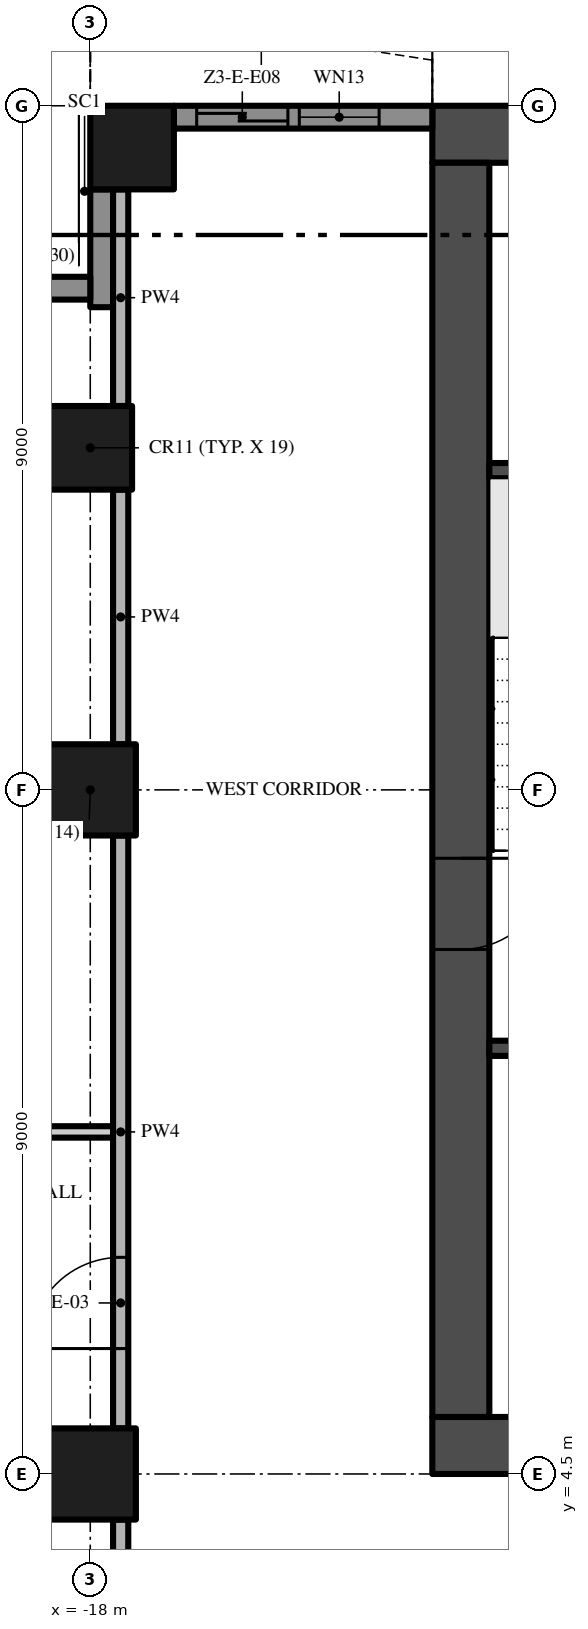
"""IFC4 building model, lengths in metres.
Left out: names, types, materials, properties, quantities, classifications, styles, units other than length and angle.
Written with IfcOpenShell. Run it as: python <this file> out.ifc"""

import sys

from ifc_helpers import new_model, si_unit, direction, frame, frame_2d, origin, origin_2d, place, context, subcontext, project, spatial, polyline, rectangle, outline, extrude, element, fill, save


model = new_model("IFC4")
c1 = context("Model", 3, precision=1e-05, world=origin(), true_north=direction((0.0, 1.0)))
c2 = subcontext(c1, "Body", "Model", "MODEL_VIEW")
j1 = project(units=[si_unit("LENGTHUNIT", "METRE"), si_unit("PLANEANGLEUNIT", "RADIAN")], contexts=[c1])
p1 = place(None, origin())
s1 = spatial("IfcSite", under=j1, at=p1, CompositionType="ELEMENT")
p2 = place(p1, origin())
s2 = spatial("IfcBuilding", under=s1, at=p2, CompositionType="ELEMENT")
p3 = place(p2, frame((0.0, 0.0, 166.8)))
s3 = spatial("IfcBuildingStorey", under=s2, at=p3, CompositionType="ELEMENT", Elevation=166.8)
p4 = place(p3, frame((-13.5, 4.875, -0.3), z_axis=(0.0, 0.0, 1.0), x_axis=(1.0, 0.0, 0.0)))
e1 = element("IfcWall", 1, at=p4, inside=s3, PredefinedType="SHEAR", context=c2, shape_type="SweptSolid", body=[
    extrude(rectangle(XDim=27.0, YDim=0.75, at=frame_2d((13.5, 0.0))), origin(), (0.0, 0.0, 1.0), 3.8),
])
p5 = place(p4, frame((12.0, 0.0, 0.3)))
e2 = element("IfcOpeningElement", 2, at=p5, cuts=e1, PredefinedType="OPENING", context=c2, shape_type="SweptSolid", body=[
    extrude(rectangle(XDim=3.0, YDim=2.4, at=frame_2d((1.5, 1.2))), frame((0.0, 0.385, 0.0), z_axis=(0.0, -1.0, 0.0), x_axis=(1.0, 0.0, 0.0)), (0.0, 0.0, 1.0), 0.77),
])
p6 = place(p4, frame((4.9, 0.0, 0.3)))
e3 = element("IfcOpeningElement", 3, at=p6, cuts=e1, PredefinedType="OPENING", context=c2, shape_type="SweptSolid", body=[
    extrude(rectangle(XDim=1.2, YDim=2.2, at=frame_2d((0.6, 1.1))), frame((0.0, 0.385, 0.0), z_axis=(0.0, -1.0, 0.0), x_axis=(1.0, 0.0, 0.0)), (0.0, 0.0, 1.0), 0.77),
])
p7 = place(p4, frame((20.75, 0.0, 0.3)))
e4 = element("IfcOpeningElement", 4, at=p7, cuts=e1, PredefinedType="OPENING", context=c2, shape_type="SweptSolid", body=[
    extrude(rectangle(XDim=1.5, YDim=2.2, at=frame_2d((0.75, 1.1))), frame((0.0, 0.385, 0.0), z_axis=(0.0, -1.0, 0.0), x_axis=(1.0, 0.0, 0.0)), (0.0, 0.0, 1.0), 0.77),
])
p8 = place(p4, frame((17.4, 0.0, 0.3)))
e5 = element("IfcOpeningElement", 5, at=p8, cuts=e1, PredefinedType="OPENING", context=c2, shape_type="SweptSolid", body=[
    extrude(rectangle(XDim=1.2, YDim=2.2, at=frame_2d((0.6, 1.1))), frame((0.0, 0.385, 0.0), z_axis=(0.0, -1.0, 0.0), x_axis=(1.0, 0.0, 0.0)), (0.0, 0.0, 1.0), 0.77),
])
p9 = place(p3, frame((13.5, 22.125, -0.3), z_axis=(0.0, 0.0, 1.0), x_axis=(-1.0, 0.0, 0.0)))
e6 = element("IfcWall", 6, at=p9, inside=s3, PredefinedType="SHEAR", context=c2, shape_type="SweptSolid", body=[
    extrude(rectangle(XDim=27.0, YDim=0.75, at=frame_2d((13.5, 0.0))), origin(), (0.0, 0.0, 1.0), 3.8),
])
p10 = place(p3, frame((-13.125, 21.75, -0.3), z_axis=(0.0, 0.0, 1.0), x_axis=(0.0, -1.0, 0.0)))
e7 = element("IfcWall", 7, at=p10, inside=s3, PredefinedType="SHEAR", context=c2, shape_type="SweptSolid", body=[
    extrude(rectangle(XDim=16.5, YDim=0.75, at=frame_2d((8.25, 0.0))), origin(), (0.0, 0.0, 1.0), 3.8),
])
p11 = place(p10, frame((9.15, 0.0, 0.3)))
e8 = element("IfcOpeningElement", 8, at=p11, cuts=e7, PredefinedType="OPENING", context=c2, shape_type="SweptSolid", body=[
    extrude(rectangle(XDim=1.2, YDim=2.2, at=frame_2d((0.6, 1.1))), frame((0.0, 0.385, 0.0), z_axis=(0.0, -1.0, 0.0), x_axis=(1.0, 0.0, 0.0)), (0.0, 0.0, 1.0), 0.77),
])
p12 = place(p3, frame((-18.0, 13.5, 0.0), z_axis=(0.0, 0.0, 1.0), x_axis=(1.0, 0.0, 0.0)))
e9 = element("IfcColumn", 9, at=p12, inside=s3, PredefinedType="COLUMN", context=c2, shape_type="SweptSolid", body=[
    extrude(rectangle(XDim=1.2, YDim=1.2, at=origin_2d()), origin(), (0.0, 0.0, 1.0), 3.5),
])
p13 = place(p3, frame((-17.45, 21.95, 0.0), z_axis=(0.0, 0.0, 1.0), x_axis=(1.0, 0.0, 0.0)))
e10 = element("IfcColumn", 10, at=p13, inside=s3, PredefinedType="COLUMN", context=c2, shape_type="SweptSolid", body=[
    extrude(rectangle(XDim=1.1, YDim=1.1, at=origin_2d()), origin(), (0.0, 0.0, 1.0), 3.5),
])
p14 = place(p3, frame((-18.0, 4.5, 0.0), z_axis=(0.0, 0.0, 1.0), x_axis=(1.0, 0.0, 0.0)))
e11 = element("IfcColumn", 11, at=p14, inside=s3, PredefinedType="COLUMN", context=c2, shape_type="SweptSolid", body=[
    extrude(rectangle(XDim=1.2, YDim=1.2, at=origin_2d()), origin(), (0.0, 0.0, 1.0), 3.5),
])
p15 = place(p3, frame((-18.0, 18.0, 0.0), z_axis=(0.0, 0.0, 1.0), x_axis=(1.0, 0.0, 0.0)))
e12 = element("IfcColumn", 12, at=p15, inside=s3, PredefinedType="COLUMN", context=c2, shape_type="SweptSolid", body=[
    extrude(rectangle(XDim=1.1, YDim=1.1, at=origin_2d()), origin(), (0.0, 0.0, 1.0), 3.5),
])
p16 = place(p3, frame((-16.9, 22.35, 0.0), z_axis=(0.0, 0.0, 1.0), x_axis=(1.0, 0.0, 0.0)))
e13 = element("IfcWall", 13, at=p16, inside=s3, PredefinedType="SOLIDWALL", context=c2, shape_type="SweptSolid", body=[
    extrude(rectangle(XDim=3.4, YDim=0.3, at=frame_2d((1.7, 0.0))), origin(), (0.0, 0.0, 1.0), 3.5),
])
p17 = place(p16, frame((1.65, 0.0, 0.45)))
e14 = element("IfcOpeningElement", 14, at=p17, cuts=e13, PredefinedType="OPENING", context=c2, shape_type="SweptSolid", body=[
    extrude(rectangle(XDim=1.05, YDim=2.65, at=frame_2d((0.525, 1.325))), frame((0.0, 0.16, 0.0), z_axis=(0.0, -1.0, 0.0), x_axis=(1.0, 0.0, 0.0)), (0.0, 0.0, 1.0), 0.32),
])
p18 = place(p16, frame((0.3, 0.0, 0.0)))
e15 = element("IfcOpeningElement", 15, at=p18, cuts=e13, PredefinedType="OPENING", context=c2, shape_type="SweptSolid", body=[
    extrude(rectangle(XDim=1.2, YDim=2.4, at=frame_2d((0.6, 1.2))), frame((0.0, 0.16, 0.0), z_axis=(0.0, -1.0, 0.0), x_axis=(1.0, 0.0, 0.0)), (0.0, 0.0, 1.0), 0.32),
])
p19 = place(p3, frame((-17.85, 19.85, 0.0), z_axis=(0.0, 0.0, 1.0), x_axis=(0.0, 1.0, 0.0)))
e16 = element("IfcWall", 16, at=p19, inside=s3, PredefinedType="SOLIDWALL", context=c2, shape_type="SweptSolid", body=[
    extrude(rectangle(XDim=1.55, YDim=0.3, at=frame_2d((0.775, 0.0))), origin(), (0.0, 0.0, 1.0), 3.5),
])
p20 = place(p3, frame((-20.25, 20.1, 0.0), z_axis=(0.0, 0.0, 1.0), x_axis=(1.0, 0.0, 0.0)))
e17 = element("IfcWall", 17, at=p20, inside=s3, PredefinedType="SOLIDWALL", context=c2, shape_type="SweptSolid", body=[
    extrude(rectangle(XDim=2.25, YDim=0.3, at=frame_2d((1.125, 0.0))), origin(), (0.0, 0.0, 1.0), 3.5),
])
p21 = place(p3, origin())
e18 = element("IfcWall", 18, at=p21, inside=s3, PredefinedType="USERDEFINED", context=c2, shape_type="SweptSolid", body=[
    extrude(outline(polyline([(-13.5, 23.1), (-15.0, 23.329), (-16.5, 23.929), (-18.0, 24.671), (-18.111, 24.447), (-16.602, 23.701), (-15.066, 23.086), (-13.538, 22.853), (-13.5, 23.1)])), origin(), (0.0, 0.0, 1.0), 0.9),
])
for number, where, z_axis, x_axis in (
    (19, (-12.75, 10.1, 0.0), (0.0, 0.0, 1.0), (1.0, 0.0, 0.0)),
    (20, (-12.75, 17.7, 0.0), (0.0, 0.0, 1.0), (1.0, 0.0, 0.0)),
):
    element("IfcWall", number, at=place(p3, frame(where, z_axis=z_axis, x_axis=x_axis)), inside=s3, PredefinedType="SHEAR", context=c2, shape_type="SweptSolid", body=[
        extrude(rectangle(XDim=3.1, YDim=0.2, at=frame_2d((1.55, 0.0))), origin(), (0.0, 0.0, 1.0), 3.5),
    ])
p22 = place(p3, frame((-22.2, 9.0, 0.0), z_axis=(0.0, 0.0, 1.0), x_axis=(1.0, 0.0, 0.0)))
e21 = element("IfcWall", 21, at=p22, inside=s3, PredefinedType="PARTITIONING", context=c2, shape_type="SweptSolid", body=[
    extrude(rectangle(XDim=4.5, YDim=0.15, at=frame_2d((2.25, 0.0))), origin(), (0.0, 0.0, 1.0), 3.5),
])
p23 = place(p22, frame((1.65, 0.0, 0.0)))
e22 = element("IfcOpeningElement", 22, at=p23, cuts=e21, PredefinedType="OPENING", context=c2, shape_type="SweptSolid", body=[
    extrude(rectangle(XDim=1.0, YDim=2.4, at=frame_2d((0.5, 1.2))), frame((0.0, 0.085, 0.0), z_axis=(0.0, -1.0, 0.0), x_axis=(1.0, 0.0, 0.0)), (0.0, 0.0, 1.0), 0.17),
])
p24 = place(p3, frame((-17.6, -0.2, 0.0), z_axis=(0.0, 0.0, 1.0), x_axis=(0.0, 1.0, 0.0)))
e23 = element("IfcWall", 23, at=p24, inside=s3, PredefinedType="PARTITIONING", context=c2, shape_type="SweptSolid", body=[
    extrude(rectangle(XDim=4.1, YDim=0.2, at=frame_2d((2.05, 0.0))), origin(), (0.0, 0.0, 1.0), 3.5),
])
p25 = place(p3, frame((-17.6, 5.1, 0.0), z_axis=(0.0, 0.0, 1.0), x_axis=(0.0, 1.0, 0.0)))
e24 = element("IfcWall", 24, at=p25, inside=s3, PredefinedType="PARTITIONING", context=c2, shape_type="SweptSolid", body=[
    extrude(rectangle(XDim=7.8, YDim=0.2, at=frame_2d((3.9, 0.0))), origin(), (0.0, 0.0, 1.0), 3.5),
])
p26 = place(p25, frame((1.05, 0.0, 0.0)))
e25 = element("IfcOpeningElement", 25, at=p26, cuts=e24, PredefinedType="OPENING", context=c2, shape_type="SweptSolid", body=[
    extrude(rectangle(XDim=1.2, YDim=2.4, at=frame_2d((0.6, 1.2))), frame((0.0, 0.11, 0.0), z_axis=(0.0, -1.0, 0.0), x_axis=(1.0, 0.0, 0.0)), (0.0, 0.0, 1.0), 0.22),
])
p27 = place(p3, frame((-17.6, 14.1, 0.0), z_axis=(0.0, 0.0, 1.0), x_axis=(0.0, 1.0, 0.0)))
e26 = element("IfcWall", 26, at=p27, inside=s3, PredefinedType="PARTITIONING", context=c2, shape_type="SweptSolid", body=[
    extrude(rectangle(XDim=3.35, YDim=0.2, at=frame_2d((1.675, 0.0))), origin(), (0.0, 0.0, 1.0), 3.5),
])
p28 = place(p3, frame((-17.6, 18.55, 0.0), z_axis=(0.0, 0.0, 1.0), x_axis=(0.0, 1.0, 0.0)))
e27 = element("IfcWall", 27, at=p28, inside=s3, PredefinedType="PARTITIONING", context=c2, shape_type="SweptSolid", body=[
    extrude(rectangle(XDim=2.85, YDim=0.2, at=frame_2d((1.425, 0.0))), origin(), (0.0, 0.0, 1.0), 3.5),
])
p29 = place(p17, origin())
e28 = element("IfcWindow", 28, at=p29, inside=s3, PartitioningType="SINGLE_PANEL", PredefinedType="WINDOW", context=c2, shape_type="SweptSolid", body=[
    extrude(rectangle(XDim=1.05, YDim=2.65, at=frame_2d((0.525, 1.325))), frame((0.0, 0.03, 0.0), z_axis=(0.0, -1.0, 0.0), x_axis=(1.0, 0.0, 0.0)), (0.0, 0.0, 1.0), 0.06),
])
fill(e14, e28)
p30 = place(p18, origin())
e29 = element("IfcDoor", 29, at=p30, inside=s3, OperationType="SINGLE_SWING_LEFT", PredefinedType="DOOR", context=c2, shape_type="SweptSolid", body=[
    extrude(rectangle(XDim=1.2, YDim=2.4, at=frame_2d((0.6, 1.2))), frame((0.0, 0.025, 0.0), z_axis=(0.0, -1.0, 0.0), x_axis=(1.0, 0.0, 0.0)), (0.0, 0.0, 1.0), 0.05),
])
fill(e15, e29)
p31 = place(p11, frame((1.2, 0.0, 0.0), z_axis=(0.0, 0.0, 1.0), x_axis=(-1.0, 0.0, 0.0)))
e30 = element("IfcDoor", 30, at=p31, inside=s3, OperationType="SINGLE_SWING_RIGHT", PredefinedType="DOOR", context=c2, shape_type="SweptSolid", body=[
    extrude(rectangle(XDim=1.2, YDim=2.2, at=frame_2d((0.6, 1.1))), frame((0.0, 0.025, 0.0), z_axis=(0.0, -1.0, 0.0), x_axis=(1.0, 0.0, 0.0)), (0.0, 0.0, 1.0), 0.05),
])
fill(e8, e30)
p32 = place(p26, origin())
e31 = element("IfcDoor", 31, at=p32, inside=s3, OperationType="SINGLE_SWING_LEFT", PredefinedType="DOOR", context=c2, shape_type="SweptSolid", body=[
    extrude(rectangle(XDim=1.2, YDim=2.4, at=frame_2d((0.6, 1.2))), frame((0.0, 0.025, 0.0), z_axis=(0.0, -1.0, 0.0), x_axis=(1.0, 0.0, 0.0)), (0.0, 0.0, 1.0), 0.05),
])
fill(e25, e31)
save(model, sys.argv[1])
